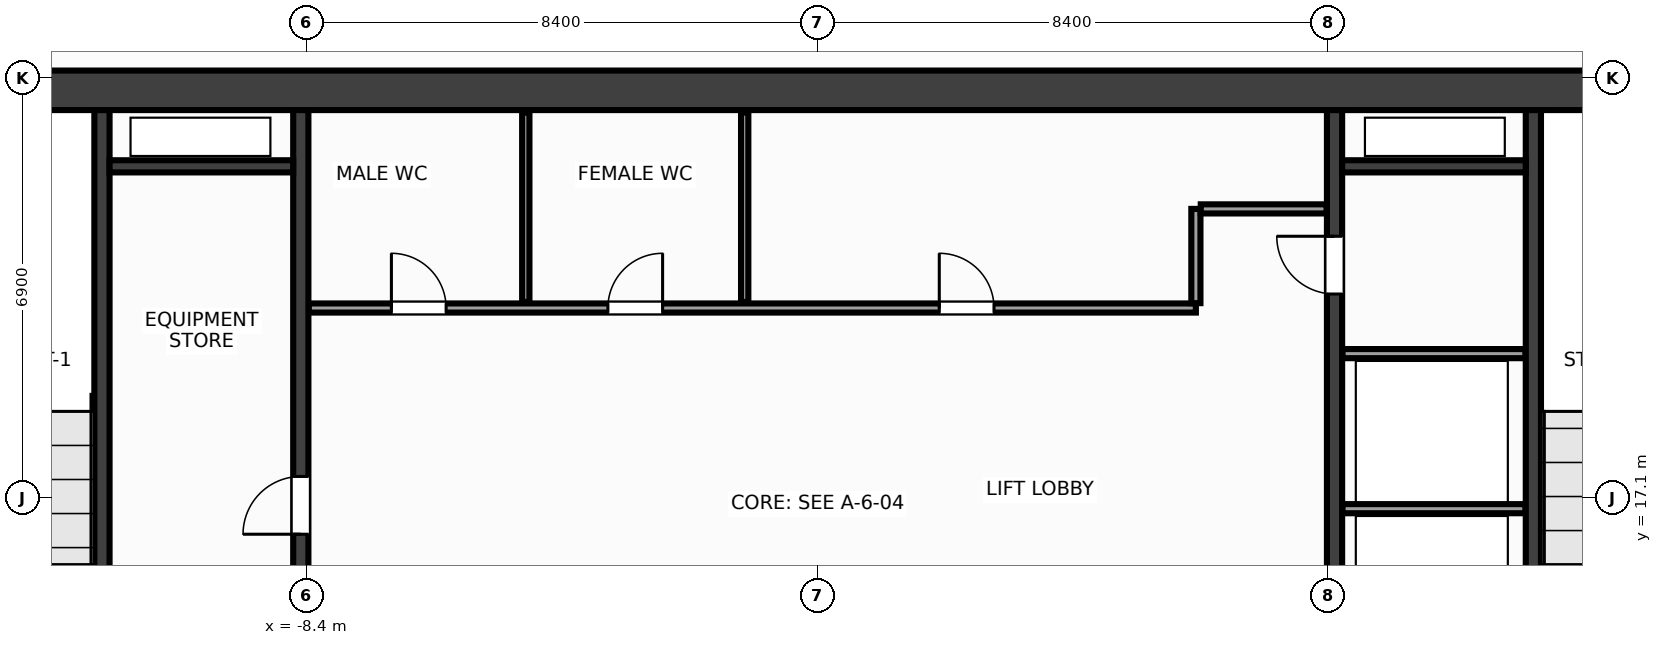
"""IFC4 building model, lengths in metres.
Left out: names, types, materials, properties, quantities, classifications, styles, units other than length and angle.
Written with IfcOpenShell. Run it as: python <this file> out.ifc"""

import sys

from ifc_helpers import new_model, si_unit, direction, frame, frame_2d, origin, place, context, subcontext, project, spatial, rectangle, extrude, source, transform, mapped, element, fill, save


model = new_model("IFC4")
c1 = context("Model", 3, precision=1e-05, world=origin(), true_north=direction((0.0, 1.0)))
c2 = subcontext(c1, "Body", "Model", "MODEL_VIEW")
j1 = project(units=[si_unit("LENGTHUNIT", "METRE"), si_unit("PLANEANGLEUNIT", "RADIAN")], contexts=[c1])
p1 = place(None, origin())
s1 = spatial("IfcSite", under=j1, at=p1, CompositionType="ELEMENT")
p2 = place(p1, origin())
s2 = spatial("IfcBuilding", under=s1, at=p2, CompositionType="ELEMENT")
p3 = place(p2, frame((0.0, 0.0, 106.4)))
s3 = spatial("IfcBuildingStorey", under=s2, at=p3, CompositionType="ELEMENT", Elevation=106.4)
m1 = source(origin(), c2, "Body", "SweptSolid", [
    extrude(rectangle(XDim=31.85, YDim=0.65, at=frame_2d((15.925, 0.0))), origin(), (0.0, 0.0, 1.0), 3.6),
])
p4 = place(p3, frame((-15.925, 23.8, 0.0), z_axis=(0.0, 0.0, 1.0), x_axis=(1.0, 0.0, 0.0)))
e1 = element("IfcWall", 1, at=p4, inside=s3, PredefinedType="SHEAR", context=c2, shape_type="MappedRepresentation", body=[
    mapped(m1, transform((0.0, 0.0, 0.0), x_axis=(1.0, 0.0, 0.0), y_axis=(0.0, 1.0, 0.0), z_axis=(0.0, 0.0, 1.0), scale=1.0)),
])
m2 = source(origin(), c2, "Body", "SweptSolid", [
    extrude(rectangle(XDim=12.95, YDim=0.25, at=frame_2d((6.475, 0.0))), origin(), (0.0, 0.0, 1.0), 3.6),
])
p5 = place(p3, frame((-8.5, 10.525, 0.0), z_axis=(0.0, 0.0, 1.0), x_axis=(0.0, 1.0, 0.0)))
e2 = element("IfcWall", 2, at=p5, inside=s3, PredefinedType="SHEAR", context=c2, shape_type="MappedRepresentation", body=[
    mapped(m2, transform((0.0, 0.0, 0.0), x_axis=(1.0, 0.0, 0.0), y_axis=(0.0, 1.0, 0.0), z_axis=(0.0, 0.0, 1.0), scale=1.0)),
])
p6 = place(p5, frame((5.975, 0.0, 0.0)))
e3 = element("IfcOpeningElement", 3, at=p6, cuts=e2, PredefinedType="OPENING", context=c2, shape_type="SweptSolid", body=[
    extrude(rectangle(XDim=0.95, YDim=2.15, at=frame_2d((0.475, 1.075))), frame((0.0, 0.137, 0.0), z_axis=(0.0, -1.0, 0.0), x_axis=(1.0, 0.0, 0.0)), (0.0, 0.0, 1.0), 0.274),
])
p7 = place(p3, frame((8.5, 10.525, 0.0), z_axis=(0.0, 0.0, 1.0), x_axis=(0.0, 1.0, 0.0)))
e4 = element("IfcWall", 4, at=p7, inside=s3, PredefinedType="SHEAR", context=c2, shape_type="MappedRepresentation", body=[
    mapped(m2, transform((0.0, 0.0, 0.0), x_axis=(1.0, 0.0, 0.0), y_axis=(0.0, 1.0, 0.0), z_axis=(0.0, 0.0, 1.0), scale=1.0)),
])
p8 = place(p7, frame((9.925, 0.0, 0.0)))
e5 = element("IfcOpeningElement", 5, at=p8, cuts=e4, PredefinedType="OPENING", context=c2, shape_type="SweptSolid", body=[
    extrude(rectangle(XDim=0.95, YDim=2.15, at=frame_2d((0.475, 1.075))), frame((0.0, 0.137, 0.0), z_axis=(0.0, -1.0, 0.0), x_axis=(1.0, 0.0, 0.0)), (0.0, 0.0, 1.0), 0.274),
])
m3 = source(origin(), c2, "Body", "SweptSolid", [
    extrude(rectangle(XDim=9.1, YDim=0.25, at=frame_2d((4.55, 0.0))), origin(), (0.0, 0.0, 1.0), 3.6),
])
for number, where, z_axis, x_axis in (
    (6, (-11.77, 14.375, 0.0), (0.0, 0.0, 1.0), (0.0, 1.0, 0.0)),
    (7, (11.77, 14.375, 0.0), (0.0, 0.0, 1.0), (0.0, 1.0, 0.0)),
):
    element("IfcWall", number, at=place(p3, frame(where, z_axis=z_axis, x_axis=x_axis)), inside=s3, PredefinedType="SHEAR", context=c2, shape_type="MappedRepresentation", body=[
        mapped(m3, transform((0.0, 0.0, 0.0), x_axis=(1.0, 0.0, 0.0), y_axis=(0.0, 1.0, 0.0), z_axis=(0.0, 0.0, 1.0), scale=1.0)),
    ])
m4 = source(origin(), c2, "Body", "SweptSolid", [
    extrude(rectangle(XDim=3.02, YDim=0.2, at=frame_2d((1.51, 0.0))), origin(), (0.0, 0.0, 1.0), 3.6),
])
for number, where, z_axis, x_axis in (
    (8, (-11.645, 22.55, 0.0), (0.0, 0.0, 1.0), (1.0, 0.0, 0.0)),
    (9, (8.625, 22.55, 0.0), (0.0, 0.0, 1.0), (1.0, 0.0, 0.0)),
):
    element("IfcWall", number, at=place(p3, frame(where, z_axis=z_axis, x_axis=x_axis)), inside=s3, PredefinedType="SHEAR", context=c2, shape_type="MappedRepresentation", body=[
        mapped(m4, transform((0.0, 0.0, 0.0), x_axis=(1.0, 0.0, 0.0), y_axis=(0.0, 1.0, 0.0), z_axis=(0.0, 0.0, 1.0), scale=1.0)),
    ])
m5 = source(origin(), c2, "Body", "SweptSolid", [
    extrude(rectangle(XDim=3.01, YDim=0.15, at=frame_2d((1.505, 0.0))), origin(), (0.0, 0.0, 1.0), 3.36),
])
for number, where, z_axis, x_axis in (
    (10, (8.63, 16.92, 0.0), (0.0, 0.0, 1.0), (1.0, 0.0, 0.0)),
    (11, (8.63, 19.47, 0.0), (0.0, 0.0, 1.0), (1.0, 0.0, 0.0)),
):
    element("IfcWall", number, at=place(p3, frame(where, z_axis=z_axis, x_axis=x_axis)), inside=s3, PredefinedType="PARTITIONING", context=c2, shape_type="MappedRepresentation", body=[
        mapped(m5, transform((0.0, 0.0, 0.0), x_axis=(1.0, 0.0, 0.0), y_axis=(0.0, 1.0, 0.0), z_axis=(0.0, 0.0, 1.0), scale=1.0)),
    ])
m6 = source(origin(), c2, "Body", "SweptSolid", [
    extrude(rectangle(XDim=14.59, YDim=0.15, at=frame_2d((7.295, 0.0))), origin(), (0.0, 0.0, 1.0), 3.36),
])
p9 = place(p3, frame((-8.37, 20.22, 0.0), z_axis=(0.0, 0.0, 1.0), x_axis=(1.0, 0.0, 0.0)))
e12 = element("IfcWall", 12, at=p9, inside=s3, PredefinedType="PARTITIONING", context=c2, shape_type="MappedRepresentation", body=[
    mapped(m6, transform((0.0, 0.0, 0.0), x_axis=(1.0, 0.0, 0.0), y_axis=(0.0, 1.0, 0.0), z_axis=(0.0, 0.0, 1.0), scale=1.0)),
])
p10 = place(p9, frame((1.36, 0.0, 0.0)))
e13 = element("IfcOpeningElement", 13, at=p10, cuts=e12, PredefinedType="OPENING", context=c2, shape_type="SweptSolid", body=[
    extrude(rectangle(XDim=0.9, YDim=2.15, at=frame_2d((0.45, 1.075))), frame((0.0, 0.087, 0.0), z_axis=(0.0, -1.0, 0.0), x_axis=(1.0, 0.0, 0.0)), (0.0, 0.0, 1.0), 0.174),
])
p11 = place(p9, frame((4.92, 0.0, 0.0)))
e14 = element("IfcOpeningElement", 14, at=p11, cuts=e12, PredefinedType="OPENING", context=c2, shape_type="SweptSolid", body=[
    extrude(rectangle(XDim=0.9, YDim=2.15, at=frame_2d((0.45, 1.075))), frame((0.0, 0.087, 0.0), z_axis=(0.0, -1.0, 0.0), x_axis=(1.0, 0.0, 0.0)), (0.0, 0.0, 1.0), 0.174),
])
p12 = place(p9, frame((10.37, 0.0, 0.0)))
e15 = element("IfcOpeningElement", 15, at=p12, cuts=e12, PredefinedType="OPENING", context=c2, shape_type="SweptSolid", body=[
    extrude(rectangle(XDim=0.9, YDim=2.15, at=frame_2d((0.45, 1.075))), frame((0.0, 0.087, 0.0), z_axis=(0.0, -1.0, 0.0), x_axis=(1.0, 0.0, 0.0)), (0.0, 0.0, 1.0), 0.174),
])
m7 = source(origin(), c2, "Body", "SweptSolid", [
    extrude(rectangle(XDim=1.55, YDim=0.15, at=frame_2d((0.775, 0.0))), origin(), (0.0, 0.0, 1.0), 3.36),
])
p13 = place(p3, frame((6.22, 20.3, 0.0), z_axis=(0.0, 0.0, 1.0), x_axis=(0.0, 1.0, 0.0)))
e16 = element("IfcWall", 16, at=p13, inside=s3, PredefinedType="PARTITIONING", context=c2, shape_type="MappedRepresentation", body=[
    mapped(m7, transform((0.0, 0.0, 0.0), x_axis=(1.0, 0.0, 0.0), y_axis=(0.0, 1.0, 0.0), z_axis=(0.0, 0.0, 1.0), scale=1.0)),
])
m8 = source(origin(), c2, "Body", "SweptSolid", [
    extrude(rectangle(XDim=2.07, YDim=0.15, at=frame_2d((1.035, 0.0))), origin(), (0.0, 0.0, 1.0), 3.36),
])
p14 = place(p3, frame((6.3, 21.85, 0.0), z_axis=(0.0, 0.0, 1.0), x_axis=(1.0, 0.0, 0.0)))
e17 = element("IfcWall", 17, at=p14, inside=s3, PredefinedType="PARTITIONING", context=c2, shape_type="MappedRepresentation", body=[
    mapped(m8, transform((0.0, 0.0, 0.0), x_axis=(1.0, 0.0, 0.0), y_axis=(0.0, 1.0, 0.0), z_axis=(0.0, 0.0, 1.0), scale=1.0)),
])
m9 = source(origin(), c2, "Body", "SweptSolid", [
    extrude(rectangle(XDim=3.115, YDim=0.12, at=frame_2d((1.558, 0.0))), origin(), (0.0, 0.0, 1.0), 3.36),
])
for number, where, z_axis, x_axis in (
    (18, (-4.8, 20.32, 0.0), (0.0, 0.0, 1.0), (0.0, 1.0, 0.0)),
    (19, (-1.2, 20.32, 0.0), (0.0, 0.0, 1.0), (0.0, 1.0, 0.0)),
):
    element("IfcWall", number, at=place(p3, frame(where, z_axis=z_axis, x_axis=x_axis)), inside=s3, PredefinedType="PARTITIONING", context=c2, shape_type="MappedRepresentation", body=[
        mapped(m9, transform((0.0, 0.0, 0.0), x_axis=(1.0, 0.0, 0.0), y_axis=(0.0, 1.0, 0.0), z_axis=(0.0, 0.0, 1.0), scale=1.0)),
    ])
m10 = source(origin(), c2, "Body", "SweptSolid", [
    extrude(rectangle(XDim=0.95, YDim=2.15, at=frame_2d((0.475, 1.075))), frame((0.0, 0.025, 0.0), z_axis=(0.0, -1.0, 0.0), x_axis=(1.0, 0.0, 0.0)), (0.0, 0.0, 1.0), 0.05),
])
p15 = place(p6, origin())
e20 = element("IfcDoor", 20, at=p15, inside=s3, OperationType="SINGLE_SWING_LEFT", PredefinedType="DOOR", context=c2, shape_type="MappedRepresentation", body=[
    mapped(m10, transform((0.0, 0.0, 0.0), x_axis=(1.0, 0.0, 0.0), y_axis=(0.0, 1.0, 0.0), z_axis=(0.0, 0.0, 1.0), scale=1.0)),
])
fill(e3, e20)
m11 = source(origin(), c2, "Body", "SweptSolid", [
    extrude(rectangle(XDim=0.95, YDim=2.15, at=frame_2d((0.475, 1.075))), frame((0.0, 0.025, 0.0), z_axis=(0.0, -1.0, 0.0), x_axis=(1.0, 0.0, 0.0)), (0.0, 0.0, 1.0), 0.05),
])
p16 = place(p8, origin())
e21 = element("IfcDoor", 21, at=p16, inside=s3, OperationType="SINGLE_SWING_RIGHT", PredefinedType="DOOR", context=c2, shape_type="MappedRepresentation", body=[
    mapped(m11, transform((0.0, 0.0, 0.0), x_axis=(1.0, 0.0, 0.0), y_axis=(0.0, 1.0, 0.0), z_axis=(0.0, 0.0, 1.0), scale=1.0)),
])
fill(e5, e21)
m12 = source(origin(), c2, "Body", "SweptSolid", [
    extrude(rectangle(XDim=0.9, YDim=2.15, at=frame_2d((0.45, 1.075))), frame((0.0, 0.025, 0.0), z_axis=(0.0, -1.0, 0.0), x_axis=(1.0, 0.0, 0.0)), (0.0, 0.0, 1.0), 0.05),
])
p17 = place(p10, origin())
e22 = element("IfcDoor", 22, at=p17, inside=s3, OperationType="SINGLE_SWING_LEFT", PredefinedType="DOOR", context=c2, shape_type="MappedRepresentation", body=[
    mapped(m12, transform((0.0, 0.0, 0.0), x_axis=(1.0, 0.0, 0.0), y_axis=(0.0, 1.0, 0.0), z_axis=(0.0, 0.0, 1.0), scale=1.0)),
])
fill(e13, e22)
p18 = place(p11, origin())
e23 = element("IfcDoor", 23, at=p18, inside=s3, OperationType="SINGLE_SWING_RIGHT", PredefinedType="DOOR", context=c2, shape_type="MappedRepresentation", body=[
    mapped(m12, transform((0.0, 0.0, 0.0), x_axis=(1.0, 0.0, 0.0), y_axis=(0.0, 1.0, 0.0), z_axis=(0.0, 0.0, 1.0), scale=1.0)),
])
fill(e14, e23)
p19 = place(p12, origin())
e24 = element("IfcDoor", 24, at=p19, inside=s3, OperationType="SINGLE_SWING_LEFT", PredefinedType="DOOR", context=c2, shape_type="MappedRepresentation", body=[
    mapped(m12, transform((0.0, 0.0, 0.0), x_axis=(1.0, 0.0, 0.0), y_axis=(0.0, 1.0, 0.0), z_axis=(0.0, 0.0, 1.0), scale=1.0)),
])
fill(e15, e24)
save(model, sys.argv[1])
